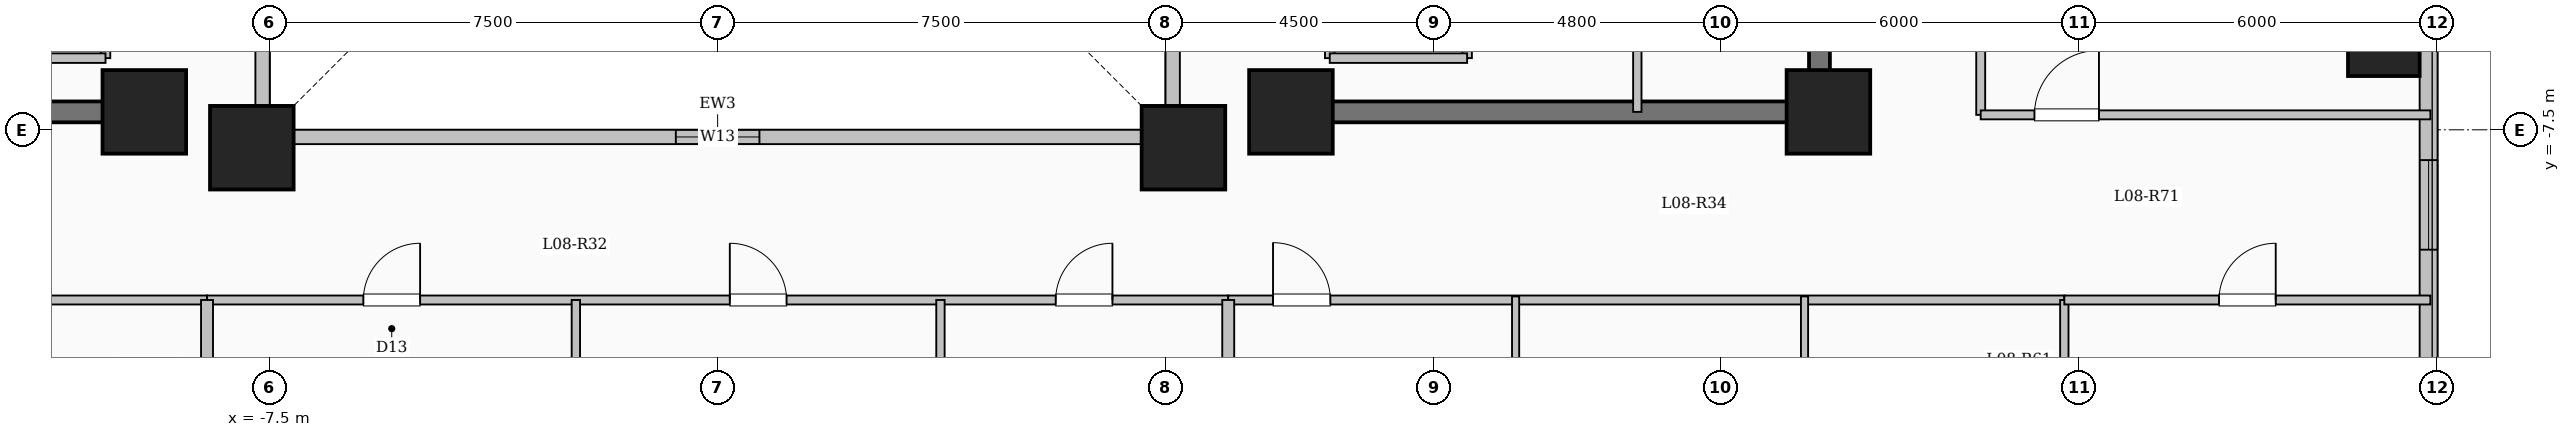
"""IFC4 building model, lengths in metres.
Left out: names, types, materials, properties, quantities, classifications, styles, units other than length and angle.
Written with IfcOpenShell. Run it as: python <this file> out.ifc"""

import sys

from ifc_helpers import new_model, si_unit, direction, frame, frame_2d, origin, origin_2d, place, context, subcontext, project, spatial, rectangle, extrude, element, fill, save


model = new_model("IFC4")
c1 = context("Model", 3, precision=1e-05, world=origin(), true_north=direction((0.0, 1.0)))
c2 = subcontext(c1, "Body", "Model", "MODEL_VIEW")
j1 = project(units=[si_unit("LENGTHUNIT", "METRE"), si_unit("PLANEANGLEUNIT", "RADIAN")], contexts=[c1])
p1 = place(None, origin())
s1 = spatial("IfcSite", under=j1, at=p1, CompositionType="ELEMENT")
p2 = place(p1, origin())
s2 = spatial("IfcBuilding", under=s1, at=p2, CompositionType="ELEMENT")
p3 = place(p2, frame((0.0, 0.0, 34.05)))
s3 = spatial("IfcBuildingStorey", under=s2, at=p3, CompositionType="ELEMENT", Elevation=34.05)
for number, where, z_axis, x_axis in (
    (1, (-7.8, -7.8, 0.0), (0.0, 0.0, 1.0), (1.0, 0.0, 0.0)),
    (2, (7.8, -7.8, 0.0), (0.0, 0.0, 1.0), (1.0, 0.0, 0.0)),
    (3, (-9.6, -7.2, 0.0), (0.0, 0.0, 1.0), (1.0, 0.0, 0.0)),
    (4, (9.6, -7.2, 0.0), (0.0, 0.0, 1.0), (1.0, 0.0, 0.0)),
    (5, (18.6, -7.2, 0.0), (0.0, 0.0, 1.0), (1.0, 0.0, 0.0)),
):
    element("IfcColumn", number, at=place(p3, frame(where, z_axis=z_axis, x_axis=x_axis)), inside=s3, PredefinedType="COLUMN", context=c2, shape_type="SweptSolid", body=[
        extrude(rectangle(XDim=1.4, YDim=1.4, at=origin_2d()), origin(), (0.0, 0.0, 1.0), 3.35),
    ])
p4 = place(p3, frame((27.9, -6.0, 0.0), z_axis=(0.0, 0.0, 1.0), x_axis=(1.0, 0.0, 0.0)))
e6 = element("IfcColumn", 6, at=p4, inside=s3, PredefinedType="COLUMN", context=c2, shape_type="SweptSolid", body=[
    extrude(rectangle(XDim=1.2, YDim=1.2, at=origin_2d()), origin(), (0.0, 0.0, 1.0), 3.35),
])
p5 = place(p3, frame((-7.62, -7.62, 0.0), z_axis=(0.0, 0.0, 1.0), x_axis=(1.0, 0.0, 0.0)))
e7 = element("IfcWall", 7, at=p5, inside=s3, PredefinedType="SOLIDWALL", context=c2, shape_type="SweptSolid", body=[
    extrude(rectangle(XDim=15.24, YDim=0.24, at=frame_2d((7.62, 0.0))), origin(), (0.0, 0.0, 1.0), 3.1),
])
p6 = place(p5, frame((6.92, 0.0, 0.95)))
e8 = element("IfcOpeningElement", 8, at=p6, cuts=e7, PredefinedType="OPENING", context=c2, shape_type="SweptSolid", body=[
    extrude(rectangle(XDim=1.4, YDim=1.5, at=frame_2d((0.7, 0.75))), frame((0.0, 0.13, 0.0), z_axis=(0.0, -1.0, 0.0), x_axis=(1.0, 0.0, 0.0)), (0.0, 0.0, 1.0), 0.26),
])
p7 = place(p3, frame((7.62, -7.62, 0.0), z_axis=(0.0, 0.0, 1.0), x_axis=(0.0, 1.0, 0.0)))
e9 = element("IfcWall", 9, at=p7, inside=s3, PredefinedType="SOLIDWALL", context=c2, shape_type="SweptSolid", body=[
    extrude(rectangle(XDim=15.24, YDim=0.24, at=frame_2d((7.62, 0.0))), origin(), (0.0, 0.0, 1.0), 3.1),
])
p8 = place(p7, frame((6.92, 0.0, 0.95)))
e10 = element("IfcOpeningElement", 10, at=p8, cuts=e9, PredefinedType="OPENING", context=c2, shape_type="SweptSolid", body=[
    extrude(rectangle(XDim=1.4, YDim=1.5, at=frame_2d((0.7, 0.75))), frame((0.0, 0.13, 0.0), z_axis=(0.0, -1.0, 0.0), x_axis=(1.0, 0.0, 0.0)), (0.0, 0.0, 1.0), 0.26),
])
p9 = place(p3, frame((-7.62, 7.62, 0.0), z_axis=(0.0, 0.0, 1.0), x_axis=(0.0, -1.0, 0.0)))
e11 = element("IfcWall", 11, at=p9, inside=s3, PredefinedType="SOLIDWALL", context=c2, shape_type="SweptSolid", body=[
    extrude(rectangle(XDim=15.24, YDim=0.24, at=frame_2d((7.62, 0.0))), origin(), (0.0, 0.0, 1.0), 3.1),
])
p10 = place(p9, frame((6.92, 0.0, 0.95)))
e12 = element("IfcOpeningElement", 12, at=p10, cuts=e11, PredefinedType="OPENING", context=c2, shape_type="SweptSolid", body=[
    extrude(rectangle(XDim=1.4, YDim=1.5, at=frame_2d((0.7, 0.75))), frame((0.0, 0.13, 0.0), z_axis=(0.0, -1.0, 0.0), x_axis=(1.0, 0.0, 0.0)), (0.0, 0.0, 1.0), 0.26),
])
p11 = place(p3, frame((28.65, 19.05, 0.0), z_axis=(0.0, 0.0, 1.0), x_axis=(0.0, -1.0, 0.0)))
e13 = element("IfcWall", 13, at=p11, inside=s3, PredefinedType="SOLIDWALL", context=c2, shape_type="SweptSolid", body=[
    extrude(rectangle(XDim=38.1, YDim=0.3, at=frame_2d((19.05, 0.0))), origin(), (0.0, 0.0, 1.0), 3.1),
])
p12 = place(p11, frame((2.275, 0.0, 0.9)))
e14 = element("IfcOpeningElement", 14, at=p12, cuts=e13, PredefinedType="OPENING", context=c2, shape_type="SweptSolid", body=[
    extrude(rectangle(XDim=2.0, YDim=1.7, at=frame_2d((1.0, 0.85))), frame((0.0, 0.16, 0.0), z_axis=(0.0, -1.0, 0.0), x_axis=(1.0, 0.0, 0.0)), (0.0, 0.0, 1.0), 0.32),
])
p13 = place(p11, frame((6.925, 0.0, 0.95)))
e15 = element("IfcOpeningElement", 15, at=p13, cuts=e13, PredefinedType="OPENING", context=c2, shape_type="SweptSolid", body=[
    extrude(rectangle(XDim=1.0, YDim=1.5, at=frame_2d((0.5, 0.75))), frame((0.0, 0.16, 0.0), z_axis=(0.0, -1.0, 0.0), x_axis=(1.0, 0.0, 0.0)), (0.0, 0.0, 1.0), 0.32),
])
p14 = place(p11, frame((16.3, 0.0, 0.9)))
e16 = element("IfcOpeningElement", 16, at=p14, cuts=e13, PredefinedType="OPENING", context=c2, shape_type="SweptSolid", body=[
    extrude(rectangle(XDim=2.0, YDim=1.7, at=frame_2d((1.0, 0.85))), frame((0.0, 0.16, 0.0), z_axis=(0.0, -1.0, 0.0), x_axis=(1.0, 0.0, 0.0)), (0.0, 0.0, 1.0), 0.32),
])
p15 = place(p11, frame((27.058, 0.0, 0.9)))
e17 = element("IfcOpeningElement", 17, at=p15, cuts=e13, PredefinedType="OPENING", context=c2, shape_type="SweptSolid", body=[
    extrude(rectangle(XDim=1.5, YDim=1.65, at=frame_2d((0.75, 0.825))), frame((0.0, 0.16, 0.0), z_axis=(0.0, -1.0, 0.0), x_axis=(1.0, 0.0, 0.0)), (0.0, 0.0, 1.0), 0.32),
])
p16 = place(p11, frame((32.55, 0.0, 0.9)))
e18 = element("IfcOpeningElement", 18, at=p16, cuts=e13, PredefinedType="OPENING", context=c2, shape_type="SweptSolid", body=[
    extrude(rectangle(XDim=2.4, YDim=1.8, at=frame_2d((1.2, 0.9))), frame((0.0, 0.16, 0.0), z_axis=(0.0, -1.0, 0.0), x_axis=(1.0, 0.0, 0.0)), (0.0, 0.0, 1.0), 0.32),
])
p17 = place(p3, frame((-10.25, -6.3, 0.0), z_axis=(0.0, 0.0, 1.0), x_axis=(0.0, 1.0, 0.0)))
e19 = element("IfcWall", 19, at=p17, inside=s3, PredefinedType="SOLIDWALL", context=c2, shape_type="SweptSolid", body=[
    extrude(rectangle(XDim=2.6, YDim=0.16, at=frame_2d((1.3, 0.0))), origin(), (0.0, 0.0, 1.0), 3.1),
])
p18 = place(p17, frame((0.75, 0.0, 0.0)))
e20 = element("IfcOpeningElement", 20, at=p18, cuts=e19, PredefinedType="OPENING", context=c2, shape_type="SweptSolid", body=[
    extrude(rectangle(XDim=1.1, YDim=2.15, at=frame_2d((0.55, 1.075))), frame((0.0, 0.09, 0.0), z_axis=(0.0, -1.0, 0.0), x_axis=(1.0, 0.0, 0.0)), (0.0, 0.0, 1.0), 0.18),
])
p19 = place(p3, frame((-12.55, -6.3, 0.0), z_axis=(0.0, 0.0, 1.0), x_axis=(1.0, 0.0, 0.0)))
e21 = element("IfcWall", 21, at=p19, inside=s3, PredefinedType="SOLIDWALL", context=c2, shape_type="SweptSolid", body=[
    extrude(rectangle(XDim=2.3, YDim=0.16, at=frame_2d((1.15, 0.0))), origin(), (0.0, 0.0, 1.0), 3.1),
])
for number, where, z_axis, x_axis in (
    (22, (10.25, -6.3, 0.0), (0.0, 0.0, 1.0), (0.0, 1.0, 0.0)),
    (23, (12.55, -6.3, 0.0), (0.0, 0.0, 1.0), (0.0, 1.0, 0.0)),
):
    element("IfcWall", number, at=place(p3, frame(where, z_axis=z_axis, x_axis=x_axis)), inside=s3, PredefinedType="SOLIDWALL", context=c2, shape_type="SweptSolid", body=[
        extrude(rectangle(XDim=2.6, YDim=0.16, at=frame_2d((1.3, 0.0))), origin(), (0.0, 0.0, 1.0), 3.1),
    ])
p20 = place(p3, frame((10.25, -6.3, 0.0), z_axis=(0.0, 0.0, 1.0), x_axis=(1.0, 0.0, 0.0)))
e24 = element("IfcWall", 24, at=p20, inside=s3, PredefinedType="SOLIDWALL", context=c2, shape_type="SweptSolid", body=[
    extrude(rectangle(XDim=2.3, YDim=0.16, at=frame_2d((1.15, 0.0))), origin(), (0.0, 0.0, 1.0), 3.1),
])
p21 = place(p3, frame((-18.625, -7.2, 0.0), z_axis=(0.0, 0.0, 1.0), x_axis=(1.0, 0.0, 0.0)))
e25 = element("IfcWall", 25, at=p21, inside=s3, PredefinedType="SHEAR", context=c2, shape_type="SweptSolid", body=[
    extrude(rectangle(XDim=8.55, YDim=0.35, at=frame_2d((4.275, 0.0))), origin(), (0.0, 0.0, 1.0), 3.35),
])
p22 = place(p3, frame((18.45, -7.375, 0.0), z_axis=(0.0, 0.0, 1.0), x_axis=(0.0, 1.0, 0.0)))
e26 = element("IfcWall", 26, at=p22, inside=s3, PredefinedType="SHEAR", context=c2, shape_type="SweptSolid", body=[
    extrude(rectangle(XDim=14.05, YDim=0.35, at=frame_2d((7.025, 0.0))), origin(), (0.0, 0.0, 1.0), 3.35),
])
p23 = place(p3, frame((10.075, -7.2, 0.0), z_axis=(0.0, 0.0, 1.0), x_axis=(1.0, 0.0, 0.0)))
e27 = element("IfcWall", 27, at=p23, inside=s3, PredefinedType="SHEAR", context=c2, shape_type="SweptSolid", body=[
    extrude(rectangle(XDim=8.55, YDim=0.35, at=frame_2d((4.275, 0.0))), origin(), (0.0, 0.0, 1.0), 3.35),
])
p24 = place(p3, frame((15.4, -7.2, 0.0), z_axis=(0.0, 0.0, 1.0), x_axis=(0.0, 1.0, 0.0)))
e28 = element("IfcWall", 28, at=p24, inside=s3, PredefinedType="PARTITIONING", context=c2, shape_type="SweptSolid", body=[
    extrude(rectangle(XDim=10.45, YDim=0.14, at=frame_2d((5.225, 0.0))), origin(), (0.0, 0.0, 1.0), 3.1),
])
p25 = place(p24, frame((9.25, 0.0, 0.0)))
e29 = element("IfcOpeningElement", 29, at=p25, cuts=e28, PredefinedType="OPENING", context=c2, shape_type="SweptSolid", body=[
    extrude(rectangle(XDim=0.9, YDim=2.08, at=frame_2d((0.45, 1.04))), frame((0.0, 0.08, 0.0), z_axis=(0.0, -1.0, 0.0), x_axis=(1.0, 0.0, 0.0)), (0.0, 0.0, 1.0), 0.16),
])
p26 = place(p3, frame((21.15, -7.25, 0.0), z_axis=(0.0, 0.0, 1.0), x_axis=(0.0, 1.0, 0.0)))
e30 = element("IfcWall", 30, at=p26, inside=s3, PredefinedType="PARTITIONING", context=c2, shape_type="SweptSolid", body=[
    extrude(rectangle(XDim=18.0, YDim=0.15, at=frame_2d((9.0, 0.0))), origin(), (0.0, 0.0, 1.0), 2.585),
])
p27 = place(p3, frame((-22.55, -10.35, 0.0), z_axis=(0.0, 0.0, 1.0), x_axis=(1.0, 0.0, 0.0)))
e31 = element("IfcWall", 31, at=p27, inside=s3, PredefinedType="PARTITIONING", context=c2, shape_type="SweptSolid", body=[
    extrude(rectangle(XDim=14.0, YDim=0.15, at=frame_2d((7.0, 0.0))), origin(), (0.0, 0.0, 1.0), 3.1),
])
p28 = place(p27, frame((0.7, 0.0, 0.0)))
e32 = element("IfcOpeningElement", 32, at=p28, cuts=e31, PredefinedType="OPENING", context=c2, shape_type="SweptSolid", body=[
    extrude(rectangle(XDim=0.96, YDim=2.15, at=frame_2d((0.48, 1.075))), frame((0.0, 0.085, 0.0), z_axis=(0.0, -1.0, 0.0), x_axis=(1.0, 0.0, 0.0)), (0.0, 0.0, 1.0), 0.17),
])
p29 = place(p3, frame((-8.55, -10.35, 0.0), z_axis=(0.0, 0.0, 1.0), x_axis=(1.0, 0.0, 0.0)))
e33 = element("IfcWall", 33, at=p29, inside=s3, PredefinedType="PARTITIONING", context=c2, shape_type="SweptSolid", body=[
    extrude(rectangle(XDim=17.1, YDim=0.15, at=frame_2d((8.55, 0.0))), origin(), (0.0, 0.0, 1.0), 3.1),
])
p30 = place(p29, frame((2.618, 0.0, 0.0)))
e34 = element("IfcOpeningElement", 34, at=p30, cuts=e33, PredefinedType="OPENING", context=c2, shape_type="SweptSolid", body=[
    extrude(rectangle(XDim=0.95, YDim=2.15, at=frame_2d((0.475, 1.075))), frame((0.0, 0.085, 0.0), z_axis=(0.0, -1.0, 0.0), x_axis=(1.0, 0.0, 0.0)), (0.0, 0.0, 1.0), 0.17),
])
p31 = place(p29, frame((8.754, 0.0, 0.0)))
e35 = element("IfcOpeningElement", 35, at=p31, cuts=e33, PredefinedType="OPENING", context=c2, shape_type="SweptSolid", body=[
    extrude(rectangle(XDim=0.95, YDim=2.15, at=frame_2d((0.475, 1.075))), frame((0.0, 0.085, 0.0), z_axis=(0.0, -1.0, 0.0), x_axis=(1.0, 0.0, 0.0)), (0.0, 0.0, 1.0), 0.17),
])
p32 = place(p29, frame((14.211, 0.0, 0.0)))
e36 = element("IfcOpeningElement", 36, at=p32, cuts=e33, PredefinedType="OPENING", context=c2, shape_type="SweptSolid", body=[
    extrude(rectangle(XDim=0.95, YDim=2.15, at=frame_2d((0.475, 1.075))), frame((0.0, 0.085, 0.0), z_axis=(0.0, -1.0, 0.0), x_axis=(1.0, 0.0, 0.0)), (0.0, 0.0, 1.0), 0.17),
])
p33 = place(p3, frame((8.55, -10.35, 0.0), z_axis=(0.0, 0.0, 1.0), x_axis=(1.0, 0.0, 0.0)))
e37 = element("IfcWall", 37, at=p33, inside=s3, PredefinedType="PARTITIONING", context=c2, shape_type="SweptSolid", body=[
    extrude(rectangle(XDim=14.0, YDim=0.15, at=frame_2d((7.0, 0.0))), origin(), (0.0, 0.0, 1.0), 3.1),
])
p34 = place(p33, frame((0.75, 0.0, 0.0)))
e38 = element("IfcOpeningElement", 38, at=p34, cuts=e37, PredefinedType="OPENING", context=c2, shape_type="SweptSolid", body=[
    extrude(rectangle(XDim=0.96, YDim=2.15, at=frame_2d((0.48, 1.075))), frame((0.0, 0.085, 0.0), z_axis=(0.0, -1.0, 0.0), x_axis=(1.0, 0.0, 0.0)), (0.0, 0.0, 1.0), 0.17),
])
p35 = place(p3, frame((13.362, -23.6, 0.0), z_axis=(0.0, 0.0, 1.0), x_axis=(0.0, 1.0, 0.0)))
e39 = element("IfcWall", 39, at=p35, inside=s3, PredefinedType="PARTITIONING", context=c2, shape_type="SweptSolid", body=[
    extrude(rectangle(XDim=13.31, YDim=0.12, at=frame_2d((6.655, 0.0))), origin(), (0.0, 0.0, 1.0), 3.1),
])
p36 = place(p35, frame((9.485, 0.0, 0.0)))
e40 = element("IfcOpeningElement", 40, at=p36, cuts=e39, PredefinedType="OPENING", context=c2, shape_type="SweptSolid", body=[
    extrude(rectangle(XDim=1.08, YDim=2.15, at=frame_2d((0.54, 1.075))), frame((0.0, 0.07, 0.0), z_axis=(0.0, -1.0, 0.0), x_axis=(1.0, 0.0, 0.0)), (0.0, 0.0, 1.0), 0.14),
])
p37 = place(p3, frame((18.2, -12.75, 0.0), z_axis=(0.0, 0.0, 1.0), x_axis=(0.0, 1.0, 0.0)))
e41 = element("IfcWall", 41, at=p37, inside=s3, PredefinedType="PARTITIONING", context=c2, shape_type="SweptSolid", body=[
    extrude(rectangle(XDim=2.46, YDim=0.12, at=frame_2d((1.23, 0.0))), origin(), (0.0, 0.0, 1.0), 3.1),
])
for number, where, z_axis, x_axis in (
    (42, (-8.55, -24.204, 0.0), (0.0, 0.0, 1.0), (0.0, 1.0, 0.0)),
    (43, (8.55, -24.204, 0.0), (0.0, 0.0, 1.0), (0.0, 1.0, 0.0)),
):
    element("IfcWall", number, at=place(p3, frame(where, z_axis=z_axis, x_axis=x_axis)), inside=s3, PredefinedType="SOLIDWALL", context=c2, shape_type="SweptSolid", body=[
        extrude(rectangle(XDim=13.854, YDim=0.2, at=frame_2d((6.927, 0.0))), origin(), (0.0, 0.0, 1.0), 3.1),
    ])
for number, where, z_axis, x_axis in (
    (44, (-2.374, -23.55, 0.0), (0.0, 0.0, 1.0), (0.0, 1.0, 0.0)),
    (45, (3.731, -23.55, 0.0), (0.0, 0.0, 1.0), (0.0, 1.0, 0.0)),
):
    element("IfcWall", number, at=place(p3, frame(where, z_axis=z_axis, x_axis=x_axis)), inside=s3, PredefinedType="PARTITIONING", context=c2, shape_type="SweptSolid", body=[
        extrude(rectangle(XDim=13.2, YDim=0.14, at=frame_2d((6.6, 0.0))), origin(), (0.0, 0.0, 1.0), 3.1),
    ])
p38 = place(p3, frame((21.15, -7.25, 0.0), z_axis=(0.0, 0.0, 1.0), x_axis=(1.0, 0.0, 0.0)))
e46 = element("IfcWall", 46, at=p38, inside=s3, PredefinedType="PARTITIONING", context=c2, shape_type="SweptSolid", body=[
    extrude(rectangle(XDim=7.53, YDim=0.15, at=frame_2d((3.765, 0.0))), origin(), (0.0, 0.0, 1.0), 3.1),
])
p39 = place(p38, frame((0.9, 0.0, 0.0)))
e47 = element("IfcOpeningElement", 47, at=p39, cuts=e46, PredefinedType="OPENING", context=c2, shape_type="SweptSolid", body=[
    extrude(rectangle(XDim=1.08, YDim=2.15, at=frame_2d((0.54, 1.075))), frame((0.0, 0.085, 0.0), z_axis=(0.0, -1.0, 0.0), x_axis=(1.0, 0.0, 0.0)), (0.0, 0.0, 1.0), 0.17),
])
p40 = place(p3, frame((22.55, -19.05, 0.0), z_axis=(0.0, 0.0, 1.0), x_axis=(0.0, 1.0, 0.0)))
e48 = element("IfcWall", 48, at=p40, inside=s3, PredefinedType="PARTITIONING", context=c2, shape_type="SweptSolid", body=[
    extrude(rectangle(XDim=8.7, YDim=0.14, at=frame_2d((4.35, 0.0))), origin(), (0.0, 0.0, 1.0), 3.1),
])
p41 = place(p3, frame((22.55, -10.35, 0.0), z_axis=(0.0, 0.0, 1.0), x_axis=(1.0, 0.0, 0.0)))
e49 = element("IfcWall", 49, at=p41, inside=s3, PredefinedType="PARTITIONING", context=c2, shape_type="SweptSolid", body=[
    extrude(rectangle(XDim=6.13, YDim=0.15, at=frame_2d((3.065, 0.0))), origin(), (0.0, 0.0, 1.0), 3.1),
])
p42 = place(p41, frame((2.59, 0.0, 0.0)))
e50 = element("IfcOpeningElement", 50, at=p42, cuts=e49, PredefinedType="OPENING", context=c2, shape_type="SweptSolid", body=[
    extrude(rectangle(XDim=0.95, YDim=2.15, at=frame_2d((0.475, 1.075))), frame((0.0, 0.085, 0.0), z_axis=(0.0, -1.0, 0.0), x_axis=(1.0, 0.0, 0.0)), (0.0, 0.0, 1.0), 0.17),
])
p43 = place(p6, origin())
e51 = element("IfcWindow", 51, at=p43, inside=s3, PartitioningType="SINGLE_PANEL", PredefinedType="WINDOW", context=c2, shape_type="SweptSolid", body=[
    extrude(rectangle(XDim=1.4, YDim=1.5, at=frame_2d((0.7, 0.75))), frame((0.0, 0.03, 0.0), z_axis=(0.0, -1.0, 0.0), x_axis=(1.0, 0.0, 0.0)), (0.0, 0.0, 1.0), 0.06),
])
fill(e8, e51)
p44 = place(p15, origin())
e52 = element("IfcWindow", 52, at=p44, inside=s3, PartitioningType="SINGLE_PANEL", PredefinedType="WINDOW", context=c2, shape_type="SweptSolid", body=[
    extrude(rectangle(XDim=1.5, YDim=1.65, at=frame_2d((0.75, 0.825))), frame((0.0, 0.03, 0.0), z_axis=(0.0, -1.0, 0.0), x_axis=(1.0, 0.0, 0.0)), (0.0, 0.0, 1.0), 0.06),
])
fill(e17, e52)
p45 = place(p34, origin())
e53 = element("IfcDoor", 53, at=p45, inside=s3, OperationType="SINGLE_SWING_LEFT", PredefinedType="DOOR", context=c2, shape_type="SweptSolid", body=[
    extrude(rectangle(XDim=0.96, YDim=2.15, at=frame_2d((0.48, 1.075))), frame((0.0, 0.025, 0.0), z_axis=(0.0, -1.0, 0.0), x_axis=(1.0, 0.0, 0.0)), (0.0, 0.0, 1.0), 0.05),
])
fill(e38, e53)
p46 = place(p30, origin())
e54 = element("IfcDoor", 54, at=p46, inside=s3, OperationType="SINGLE_SWING_RIGHT", PredefinedType="DOOR", context=c2, shape_type="SweptSolid", body=[
    extrude(rectangle(XDim=0.95, YDim=2.15, at=frame_2d((0.475, 1.075))), frame((0.0, 0.025, 0.0), z_axis=(0.0, -1.0, 0.0), x_axis=(1.0, 0.0, 0.0)), (0.0, 0.0, 1.0), 0.05),
])
fill(e34, e54)
p47 = place(p31, origin())
e55 = element("IfcDoor", 55, at=p47, inside=s3, OperationType="SINGLE_SWING_LEFT", PredefinedType="DOOR", context=c2, shape_type="SweptSolid", body=[
    extrude(rectangle(XDim=0.95, YDim=2.15, at=frame_2d((0.475, 1.075))), frame((0.0, 0.025, 0.0), z_axis=(0.0, -1.0, 0.0), x_axis=(1.0, 0.0, 0.0)), (0.0, 0.0, 1.0), 0.05),
])
fill(e35, e55)
p48 = place(p32, origin())
e56 = element("IfcDoor", 56, at=p48, inside=s3, OperationType="SINGLE_SWING_RIGHT", PredefinedType="DOOR", context=c2, shape_type="SweptSolid", body=[
    extrude(rectangle(XDim=0.95, YDim=2.15, at=frame_2d((0.475, 1.075))), frame((0.0, 0.025, 0.0), z_axis=(0.0, -1.0, 0.0), x_axis=(1.0, 0.0, 0.0)), (0.0, 0.0, 1.0), 0.05),
])
fill(e36, e56)
p49 = place(p42, origin())
e57 = element("IfcDoor", 57, at=p49, inside=s3, OperationType="SINGLE_SWING_RIGHT", PredefinedType="DOOR", context=c2, shape_type="SweptSolid", body=[
    extrude(rectangle(XDim=0.95, YDim=2.15, at=frame_2d((0.475, 1.075))), frame((0.0, 0.025, 0.0), z_axis=(0.0, -1.0, 0.0), x_axis=(1.0, 0.0, 0.0)), (0.0, 0.0, 1.0), 0.05),
])
fill(e50, e57)
p50 = place(p39, origin())
e58 = element("IfcDoor", 58, at=p50, inside=s3, OperationType="SINGLE_SWING_RIGHT", PredefinedType="DOOR", context=c2, shape_type="SweptSolid", body=[
    extrude(rectangle(XDim=1.08, YDim=2.15, at=frame_2d((0.54, 1.075))), frame((0.0, 0.025, 0.0), z_axis=(0.0, -1.0, 0.0), x_axis=(1.0, 0.0, 0.0)), (0.0, 0.0, 1.0), 0.05),
])
fill(e47, e58)
save(model, sys.argv[1])
